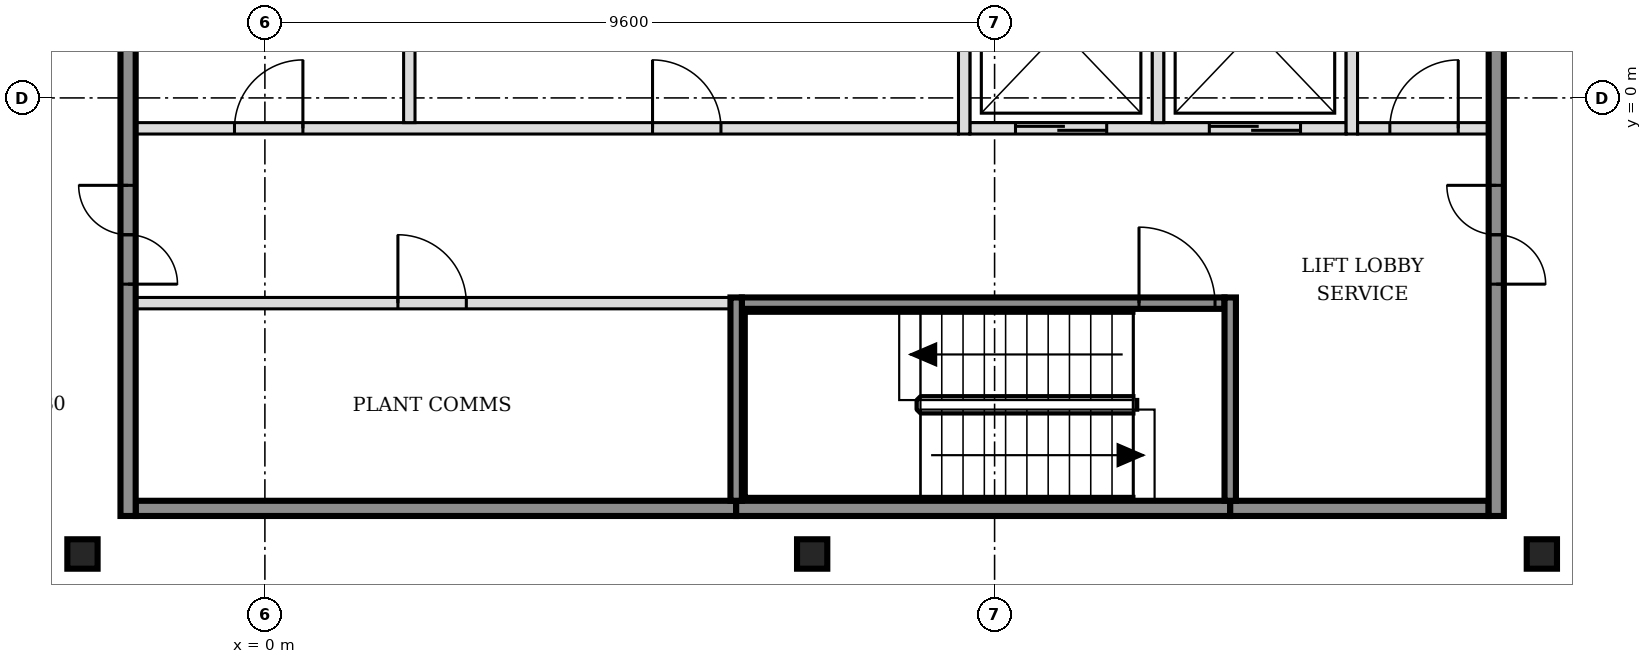
"""IFC4 building model, lengths in metres.
Left out: names, types, materials, properties, quantities, classifications, styles, units other than length and angle.
Written with IfcOpenShell. Run it as: python <this file> out.ifc"""

import sys

from ifc_helpers import new_model, si_unit, direction, frame, frame_2d, origin, origin_2d, place, context, subcontext, project, spatial, rectangle, i_section, extrude, element, fill, save


model = new_model("IFC4")
c1 = context("Model", 3, precision=1e-05, world=origin(), true_north=direction((0.0, 1.0)))
c2 = subcontext(c1, "Body", "Model", "MODEL_VIEW")
j1 = project(units=[si_unit("LENGTHUNIT", "METRE"), si_unit("PLANEANGLEUNIT", "RADIAN")], contexts=[c1])
p1 = place(None, origin())
s1 = spatial("IfcSite", under=j1, at=p1, CompositionType="ELEMENT")
p2 = place(p1, origin())
s2 = spatial("IfcBuilding", under=s1, at=p2, CompositionType="ELEMENT")
p3 = place(p2, frame((0.0, 0.0, 243.0)))
s3 = spatial("IfcBuildingStorey", under=s2, at=p3, CompositionType="ELEMENT", Elevation=243.0)
for number, where, z_axis, x_axis in (
    (1, (-2.4, -6.0, -0.15), (0.0, 0.0, 1.0), (1.0, 0.0, 0.0)),
    (2, (7.2, -6.0, -0.15), (0.0, 0.0, 1.0), (1.0, 0.0, 0.0)),
    (3, (16.8, -6.0, -0.15), (0.0, 0.0, 1.0), (1.0, 0.0, 0.0)),
):
    element("IfcColumn", number, at=place(p3, frame(where, z_axis=z_axis, x_axis=x_axis)), inside=s3, PredefinedType="COLUMN", context=c2, shape_type="SweptSolid", body=[
        extrude(i_section(OverallWidth=0.398, OverallDepth=0.387, WebThickness=0.021, FlangeThickness=0.033, FilletRadius=0.015, at=origin_2d()), origin(), (0.0, 0.0, 1.0), 3.6),
    ])
p4 = place(p3, frame((-1.7, -5.4, 0.0), z_axis=(0.0, 0.0, 1.0), x_axis=(1.0, 0.0, 0.0)))
e4 = element("IfcWall", 4, at=p4, inside=s3, PredefinedType="SOLIDWALL", context=c2, shape_type="SweptSolid", body=[
    extrude(rectangle(XDim=7.9, YDim=0.2, at=frame_2d((3.95, 0.0))), origin(), (0.0, 0.0, 1.0), 3.45),
])
p5 = place(p3, frame((6.2, -5.4, 0.0), z_axis=(0.0, 0.0, 1.0), x_axis=(1.0, 0.0, 0.0)))
e5 = element("IfcWall", 5, at=p5, inside=s3, PredefinedType="SOLIDWALL", context=c2, shape_type="SweptSolid", body=[
    extrude(rectangle(XDim=6.5, YDim=0.2, at=frame_2d((3.25, 0.0))), origin(), (0.0, 0.0, 1.0), 3.45),
])
p6 = place(p3, frame((12.7, -5.4, 0.0), z_axis=(0.0, 0.0, 1.0), x_axis=(1.0, 0.0, 0.0)))
e6 = element("IfcWall", 6, at=p6, inside=s3, PredefinedType="SOLIDWALL", context=c2, shape_type="SweptSolid", body=[
    extrude(rectangle(XDim=3.4, YDim=0.2, at=frame_2d((1.7, 0.0))), origin(), (0.0, 0.0, 1.0), 3.45),
])
p7 = place(p3, frame((-1.7, -2.7, 0.0), z_axis=(0.0, 0.0, 1.0), x_axis=(1.0, 0.0, 0.0)))
e7 = element("IfcWall", 7, at=p7, inside=s3, PredefinedType="PARTITIONING", context=c2, shape_type="SweptSolid", body=[
    extrude(rectangle(XDim=7.825, YDim=0.15, at=frame_2d((3.913, 0.0))), origin(), (0.0, 0.0, 1.0), 3.45),
])
p8 = place(p7, frame((3.45, 0.0, 0.0)))
e8 = element("IfcOpeningElement", 8, at=p8, cuts=e7, PredefinedType="OPENING", context=c2, shape_type="SweptSolid", body=[
    extrude(rectangle(XDim=0.9, YDim=2.1, at=frame_2d((0.45, 1.05))), frame((0.0, 0.085, 0.0), z_axis=(0.0, -1.0, 0.0), x_axis=(1.0, 0.0, 0.0)), (0.0, 0.0, 1.0), 0.17),
])
p9 = place(p3, frame((6.275, -2.7, 0.0), z_axis=(0.0, 0.0, 1.0), x_axis=(1.0, 0.0, 0.0)))
e9 = element("IfcWall", 9, at=p9, inside=s3, PredefinedType="SOLIDWALL", context=c2, shape_type="SweptSolid", body=[
    extrude(rectangle(XDim=6.35, YDim=0.15, at=frame_2d((3.175, 0.0))), origin(), (0.0, 0.0, 1.0), 3.45),
])
p10 = place(p9, frame((5.225, 0.0, 0.0)))
e10 = element("IfcOpeningElement", 10, at=p10, cuts=e9, PredefinedType="OPENING", context=c2, shape_type="SweptSolid", body=[
    extrude(rectangle(XDim=1.0, YDim=2.1, at=frame_2d((0.5, 1.05))), frame((0.0, 0.085, 0.0), z_axis=(0.0, -1.0, 0.0), x_axis=(1.0, 0.0, 0.0)), (0.0, 0.0, 1.0), 0.17),
])
p11 = place(p3, frame((-1.7, -0.4, 0.0), z_axis=(0.0, 0.0, 1.0), x_axis=(1.0, 0.0, 0.0)))
e11 = element("IfcWall", 11, at=p11, inside=s3, PredefinedType="PARTITIONING", context=c2, shape_type="SweptSolid", body=[
    extrude(rectangle(XDim=10.825, YDim=0.15, at=frame_2d((5.413, 0.0))), origin(), (0.0, 0.0, 1.0), 3.45),
])
p12 = place(p11, frame((1.3, 0.0, 0.0)))
e12 = element("IfcOpeningElement", 12, at=p12, cuts=e11, PredefinedType="OPENING", context=c2, shape_type="SweptSolid", body=[
    extrude(rectangle(XDim=0.9, YDim=2.1, at=frame_2d((0.45, 1.05))), frame((0.0, 0.085, 0.0), z_axis=(0.0, -1.0, 0.0), x_axis=(1.0, 0.0, 0.0)), (0.0, 0.0, 1.0), 0.17),
])
p13 = place(p11, frame((6.8, 0.0, 0.0)))
e13 = element("IfcOpeningElement", 13, at=p13, cuts=e11, PredefinedType="OPENING", context=c2, shape_type="SweptSolid", body=[
    extrude(rectangle(XDim=0.9, YDim=2.1, at=frame_2d((0.45, 1.05))), frame((0.0, 0.085, 0.0), z_axis=(0.0, -1.0, 0.0), x_axis=(1.0, 0.0, 0.0)), (0.0, 0.0, 1.0), 0.17),
])
p14 = place(p3, frame((9.275, -0.4, 0.0), z_axis=(0.0, 0.0, 1.0), x_axis=(1.0, 0.0, 0.0)))
e14 = element("IfcWall", 14, at=p14, inside=s3, PredefinedType="SOLIDWALL", context=c2, shape_type="SweptSolid", body=[
    extrude(rectangle(XDim=4.95, YDim=0.15, at=frame_2d((2.475, 0.0))), origin(), (0.0, 0.0, 1.0), 3.45),
])
p15 = place(p14, frame((0.6, 0.0, 0.0)))
e15 = element("IfcOpeningElement", 15, at=p15, cuts=e14, PredefinedType="OPENING", context=c2, shape_type="SweptSolid", body=[
    extrude(rectangle(XDim=1.2, YDim=2.1, at=frame_2d((0.6, 1.05))), frame((0.0, 0.085, 0.0), z_axis=(0.0, -1.0, 0.0), x_axis=(1.0, 0.0, 0.0)), (0.0, 0.0, 1.0), 0.17),
])
p16 = place(p14, frame((3.15, 0.0, 0.0)))
e16 = element("IfcOpeningElement", 16, at=p16, cuts=e14, PredefinedType="OPENING", context=c2, shape_type="SweptSolid", body=[
    extrude(rectangle(XDim=1.2, YDim=2.1, at=frame_2d((0.6, 1.05))), frame((0.0, 0.085, 0.0), z_axis=(0.0, -1.0, 0.0), x_axis=(1.0, 0.0, 0.0)), (0.0, 0.0, 1.0), 0.17),
])
p17 = place(p3, frame((14.375, -0.4, 0.0), z_axis=(0.0, 0.0, 1.0), x_axis=(1.0, 0.0, 0.0)))
e17 = element("IfcWall", 17, at=p17, inside=s3, PredefinedType="PARTITIONING", context=c2, shape_type="SweptSolid", body=[
    extrude(rectangle(XDim=1.725, YDim=0.15, at=frame_2d((0.863, 0.0))), origin(), (0.0, 0.0, 1.0), 3.45),
])
p18 = place(p17, frame((0.425, 0.0, 0.0)))
e18 = element("IfcOpeningElement", 18, at=p18, cuts=e17, PredefinedType="OPENING", context=c2, shape_type="SweptSolid", body=[
    extrude(rectangle(XDim=0.9, YDim=2.1, at=frame_2d((0.45, 1.05))), frame((0.0, 0.085, 0.0), z_axis=(0.0, -1.0, 0.0), x_axis=(1.0, 0.0, 0.0)), (0.0, 0.0, 1.0), 0.17),
])
p19 = place(p3, frame((-1.8, -5.5, 0.0), z_axis=(0.0, 0.0, 1.0), x_axis=(0.0, 1.0, 0.0)))
e19 = element("IfcWall", 19, at=p19, inside=s3, PredefinedType="SOLIDWALL", context=c2, shape_type="SweptSolid", body=[
    extrude(rectangle(XDim=15.8, YDim=0.2, at=frame_2d((7.9, 0.0))), origin(), (0.0, 0.0, 1.0), 3.45),
])
p20 = place(p19, frame((3.05, 0.0, 0.0)))
e20 = element("IfcOpeningElement", 20, at=p20, cuts=e19, PredefinedType="OPENING", context=c2, shape_type="SweptSolid", body=[
    extrude(rectangle(XDim=1.3, YDim=2.1, at=frame_2d((0.65, 1.05))), frame((0.0, 0.11, 0.0), z_axis=(0.0, -1.0, 0.0), x_axis=(1.0, 0.0, 0.0)), (0.0, 0.0, 1.0), 0.22),
])
p21 = place(p19, frame((11.45, 0.0, 0.0)))
e21 = element("IfcOpeningElement", 21, at=p21, cuts=e19, PredefinedType="OPENING", context=c2, shape_type="SweptSolid", body=[
    extrude(rectangle(XDim=1.3, YDim=2.1, at=frame_2d((0.65, 1.05))), frame((0.0, 0.11, 0.0), z_axis=(0.0, -1.0, 0.0), x_axis=(1.0, 0.0, 0.0)), (0.0, 0.0, 1.0), 0.22),
])
p22 = place(p3, frame((1.9, -0.325, 0.0), z_axis=(0.0, 0.0, 1.0), x_axis=(0.0, 1.0, 0.0)))
e22 = element("IfcWall", 22, at=p22, inside=s3, PredefinedType="PARTITIONING", context=c2, shape_type="SweptSolid", body=[
    extrude(rectangle(XDim=2.45, YDim=0.15, at=frame_2d((1.225, 0.0))), origin(), (0.0, 0.0, 1.0), 3.45),
])
p23 = place(p3, frame((6.2, -5.3, 0.0), z_axis=(0.0, 0.0, 1.0), x_axis=(0.0, 1.0, 0.0)))
e23 = element("IfcWall", 23, at=p23, inside=s3, PredefinedType="SOLIDWALL", context=c2, shape_type="SweptSolid", body=[
    extrude(rectangle(XDim=2.675, YDim=0.15, at=frame_2d((1.337, 0.0))), origin(), (0.0, 0.0, 1.0), 3.45),
])
p24 = place(p3, frame((9.2, -0.475, 0.0), z_axis=(0.0, 0.0, 1.0), x_axis=(0.0, 1.0, 0.0)))
e24 = element("IfcWall", 24, at=p24, inside=s3, PredefinedType="SOLIDWALL", context=c2, shape_type="SweptSolid", body=[
    extrude(rectangle(XDim=2.6, YDim=0.15, at=frame_2d((1.3, 0.0))), origin(), (0.0, 0.0, 1.0), 3.45),
])
p25 = place(p3, frame((11.75, -0.325, 0.0), z_axis=(0.0, 0.0, 1.0), x_axis=(0.0, 1.0, 0.0)))
e25 = element("IfcWall", 25, at=p25, inside=s3, PredefinedType="SOLIDWALL", context=c2, shape_type="SweptSolid", body=[
    extrude(rectangle(XDim=2.45, YDim=0.15, at=frame_2d((1.225, 0.0))), origin(), (0.0, 0.0, 1.0), 3.45),
])
p26 = place(p3, frame((12.7, -5.3, 0.0), z_axis=(0.0, 0.0, 1.0), x_axis=(0.0, 1.0, 0.0)))
e26 = element("IfcWall", 26, at=p26, inside=s3, PredefinedType="SOLIDWALL", context=c2, shape_type="SweptSolid", body=[
    extrude(rectangle(XDim=2.675, YDim=0.15, at=frame_2d((1.337, 0.0))), origin(), (0.0, 0.0, 1.0), 3.45),
])
p27 = place(p3, frame((14.3, -0.475, 0.0), z_axis=(0.0, 0.0, 1.0), x_axis=(0.0, 1.0, 0.0)))
e27 = element("IfcWall", 27, at=p27, inside=s3, PredefinedType="SOLIDWALL", context=c2, shape_type="SweptSolid", body=[
    extrude(rectangle(XDim=2.75, YDim=0.15, at=frame_2d((1.375, 0.0))), origin(), (0.0, 0.0, 1.0), 3.45),
])
p28 = place(p3, frame((16.2, -5.5, 0.0), z_axis=(0.0, 0.0, 1.0), x_axis=(0.0, 1.0, 0.0)))
e28 = element("IfcWall", 28, at=p28, inside=s3, PredefinedType="SOLIDWALL", context=c2, shape_type="SweptSolid", body=[
    extrude(rectangle(XDim=15.8, YDim=0.2, at=frame_2d((7.9, 0.0))), origin(), (0.0, 0.0, 1.0), 3.45),
])
p29 = place(p28, frame((3.05, 0.0, 0.0)))
e29 = element("IfcOpeningElement", 29, at=p29, cuts=e28, PredefinedType="OPENING", context=c2, shape_type="SweptSolid", body=[
    extrude(rectangle(XDim=1.3, YDim=2.1, at=frame_2d((0.65, 1.05))), frame((0.0, 0.11, 0.0), z_axis=(0.0, -1.0, 0.0), x_axis=(1.0, 0.0, 0.0)), (0.0, 0.0, 1.0), 0.22),
])
p30 = place(p28, frame((11.45, 0.0, 0.0)))
e30 = element("IfcOpeningElement", 30, at=p30, cuts=e28, PredefinedType="OPENING", context=c2, shape_type="SweptSolid", body=[
    extrude(rectangle(XDim=1.3, YDim=2.1, at=frame_2d((0.65, 1.05))), frame((0.0, 0.11, 0.0), z_axis=(0.0, -1.0, 0.0), x_axis=(1.0, 0.0, 0.0)), (0.0, 0.0, 1.0), 0.22),
])
p31 = place(p15, origin())
e31 = element("IfcDoor", 31, at=p31, inside=s3, OperationType="DOUBLE_DOOR_SLIDING", PredefinedType="DOOR", context=c2, shape_type="SweptSolid", body=[
    extrude(rectangle(XDim=1.2, YDim=2.1, at=frame_2d((0.6, 1.05))), frame((0.0, 0.025, 0.0), z_axis=(0.0, -1.0, 0.0), x_axis=(1.0, 0.0, 0.0)), (0.0, 0.0, 1.0), 0.05),
])
fill(e15, e31)
p32 = place(p16, origin())
e32 = element("IfcDoor", 32, at=p32, inside=s3, OperationType="DOUBLE_DOOR_SLIDING", PredefinedType="DOOR", context=c2, shape_type="SweptSolid", body=[
    extrude(rectangle(XDim=1.2, YDim=2.1, at=frame_2d((0.6, 1.05))), frame((0.0, 0.025, 0.0), z_axis=(0.0, -1.0, 0.0), x_axis=(1.0, 0.0, 0.0)), (0.0, 0.0, 1.0), 0.05),
])
fill(e16, e32)
p33 = place(p10, origin())
e33 = element("IfcDoor", 33, at=p33, inside=s3, OperationType="SINGLE_SWING_LEFT", PredefinedType="DOOR", context=c2, shape_type="SweptSolid", body=[
    extrude(rectangle(XDim=1.0, YDim=2.1, at=frame_2d((0.5, 1.05))), frame((0.0, 0.025, 0.0), z_axis=(0.0, -1.0, 0.0), x_axis=(1.0, 0.0, 0.0)), (0.0, 0.0, 1.0), 0.05),
])
fill(e10, e33)
p34 = place(p20, origin())
e34 = element("IfcDoor", 34, at=p34, inside=s3, OperationType="DOUBLE_DOOR_SINGLE_SWING", PredefinedType="DOOR", context=c2, shape_type="SweptSolid", body=[
    extrude(rectangle(XDim=1.3, YDim=2.1, at=frame_2d((0.65, 1.05))), frame((0.0, 0.025, 0.0), z_axis=(0.0, -1.0, 0.0), x_axis=(1.0, 0.0, 0.0)), (0.0, 0.0, 1.0), 0.05),
])
fill(e20, e34)
p35 = place(p29, origin())
e35 = element("IfcDoor", 35, at=p35, inside=s3, OperationType="DOUBLE_DOOR_SINGLE_SWING", PredefinedType="DOOR", context=c2, shape_type="SweptSolid", body=[
    extrude(rectangle(XDim=1.3, YDim=2.1, at=frame_2d((0.65, 1.05))), frame((0.0, 0.025, 0.0), z_axis=(0.0, -1.0, 0.0), x_axis=(1.0, 0.0, 0.0)), (0.0, 0.0, 1.0), 0.05),
])
fill(e29, e35)
p36 = place(p18, origin())
e36 = element("IfcDoor", 36, at=p36, inside=s3, OperationType="SINGLE_SWING_RIGHT", PredefinedType="DOOR", context=c2, shape_type="SweptSolid", body=[
    extrude(rectangle(XDim=0.9, YDim=2.1, at=frame_2d((0.45, 1.05))), frame((0.0, 0.025, 0.0), z_axis=(0.0, -1.0, 0.0), x_axis=(1.0, 0.0, 0.0)), (0.0, 0.0, 1.0), 0.05),
])
fill(e18, e36)
p37 = place(p8, origin())
e37 = element("IfcDoor", 37, at=p37, inside=s3, OperationType="SINGLE_SWING_LEFT", PredefinedType="DOOR", context=c2, shape_type="SweptSolid", body=[
    extrude(rectangle(XDim=0.9, YDim=2.1, at=frame_2d((0.45, 1.05))), frame((0.0, 0.025, 0.0), z_axis=(0.0, -1.0, 0.0), x_axis=(1.0, 0.0, 0.0)), (0.0, 0.0, 1.0), 0.05),
])
fill(e8, e37)
p38 = place(p12, origin())
e38 = element("IfcDoor", 38, at=p38, inside=s3, OperationType="SINGLE_SWING_RIGHT", PredefinedType="DOOR", context=c2, shape_type="SweptSolid", body=[
    extrude(rectangle(XDim=0.9, YDim=2.1, at=frame_2d((0.45, 1.05))), frame((0.0, 0.025, 0.0), z_axis=(0.0, -1.0, 0.0), x_axis=(1.0, 0.0, 0.0)), (0.0, 0.0, 1.0), 0.05),
])
fill(e12, e38)
p39 = place(p13, origin())
e39 = element("IfcDoor", 39, at=p39, inside=s3, OperationType="SINGLE_SWING_LEFT", PredefinedType="DOOR", context=c2, shape_type="SweptSolid", body=[
    extrude(rectangle(XDim=0.9, YDim=2.1, at=frame_2d((0.45, 1.05))), frame((0.0, 0.025, 0.0), z_axis=(0.0, -1.0, 0.0), x_axis=(1.0, 0.0, 0.0)), (0.0, 0.0, 1.0), 0.05),
])
fill(e13, e39)
save(model, sys.argv[1])
